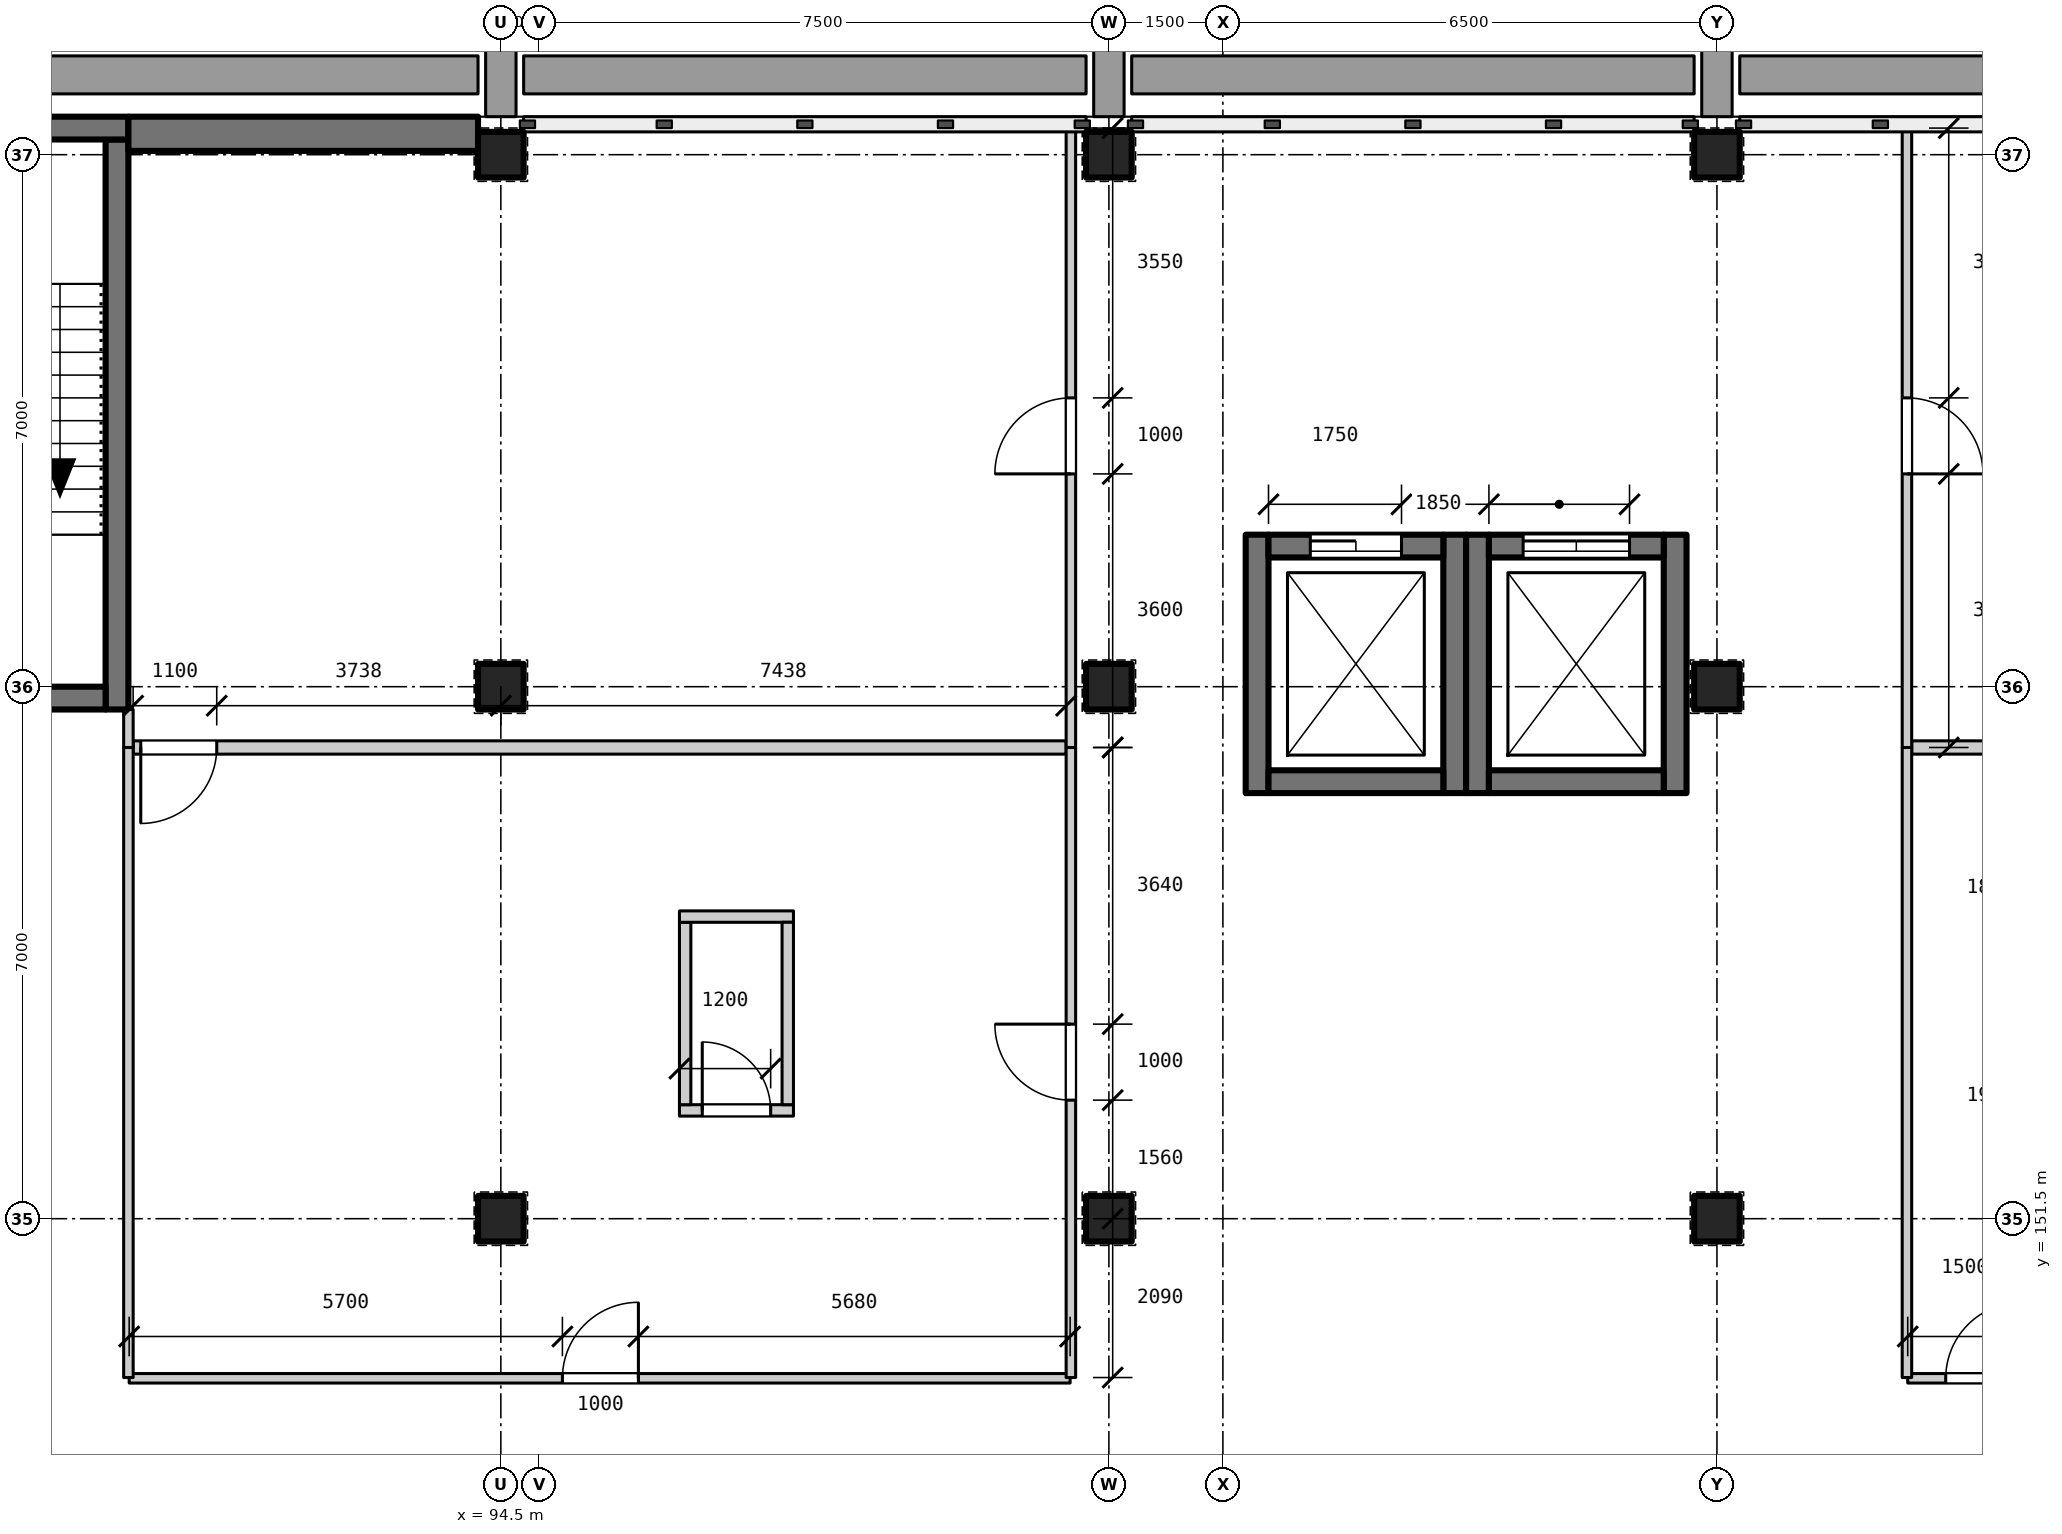
"""IFC4 building model, lengths in metres.
Left out: names, types, materials, properties, quantities, classifications, styles, units other than length and angle.
Written with IfcOpenShell. Run it as: python <this file> out.ifc"""

import sys

from ifc_helpers import new_model, si_unit, direction, frame, frame_2d, origin, origin_2d, place, context, subcontext, project, spatial, rectangle, extrude, element, fill, save


model = new_model("IFC4")
c1 = context("Model", 3, precision=1e-05, world=origin(), true_north=direction((0.0, 1.0)))
c2 = subcontext(c1, "Body", "Model", "MODEL_VIEW")
j1 = project(units=[si_unit("LENGTHUNIT", "METRE"), si_unit("PLANEANGLEUNIT", "RADIAN")], contexts=[c1])
p1 = place(None, origin())
s1 = spatial("IfcSite", under=j1, at=p1, CompositionType="ELEMENT")
p2 = place(p1, origin())
s2 = spatial("IfcBuilding", under=s1, at=p2, CompositionType="ELEMENT")
p3 = place(p2, frame((0.0, 0.0, 10.2)))
s3 = spatial("IfcBuildingStorey", under=s2, at=p3, CompositionType="ELEMENT", Elevation=10.2)
for number, where, z_axis, x_axis in (
    (1, (94.5, 151.5, 0.0), (0.0, 0.0, 1.0), (1.0, 0.0, 0.0)),
    (2, (94.5, 158.5, 0.0), (0.0, 0.0, 1.0), (1.0, 0.0, 0.0)),
    (3, (94.5, 165.5, 0.0), (0.0, 0.0, 1.0), (1.0, 0.0, 0.0)),
    (4, (102.5, 151.5, 0.0), (0.0, 0.0, 1.0), (1.0, 0.0, 0.0)),
    (5, (102.5, 158.5, 0.0), (0.0, 0.0, 1.0), (1.0, 0.0, 0.0)),
    (6, (102.5, 165.5, 0.0), (0.0, 0.0, 1.0), (1.0, 0.0, 0.0)),
    (7, (110.5, 151.5, 0.0), (0.0, 0.0, 1.0), (1.0, 0.0, 0.0)),
    (8, (110.5, 158.5, 0.0), (0.0, 0.0, 1.0), (1.0, 0.0, 0.0)),
    (9, (110.5, 165.5, 0.0), (0.0, 0.0, 1.0), (1.0, 0.0, 0.0)),
):
    element("IfcColumn", number, at=place(p3, frame(where, z_axis=z_axis, x_axis=x_axis)), inside=s3, PredefinedType="COLUMN", context=c2, shape_type="SweptSolid", body=[
        extrude(rectangle(XDim=0.6, YDim=0.6, at=origin_2d()), origin(), (0.0, 0.0, 1.0), 4.2),
    ])
p4 = place(p3, frame((89.45, 158.2, 0.0), z_axis=(0.0, 0.0, 1.0), x_axis=(0.0, 1.0, 0.0)))
e10 = element("IfcWall", 10, at=p4, inside=s3, PredefinedType="SHEAR", context=c2, shape_type="SweptSolid", body=[
    extrude(rectangle(XDim=7.5, YDim=0.3, at=frame_2d((3.75, 0.0))), origin(), (0.0, 0.0, 1.0), 4.2),
])
p5 = place(p3, frame((86.3, 158.35, 0.0), z_axis=(0.0, 0.0, 1.0), x_axis=(1.0, 0.0, 0.0)))
e11 = element("IfcWall", 11, at=p5, inside=s3, PredefinedType="SHEAR", context=c2, shape_type="SweptSolid", body=[
    extrude(rectangle(XDim=3.0, YDim=0.3, at=frame_2d((1.5, 0.0))), origin(), (0.0, 0.0, 1.0), 4.2),
])
p6 = place(p5, frame((0.95, 0.0, 0.0)))
e12 = element("IfcOpeningElement", 12, at=p6, cuts=e11, PredefinedType="OPENING", context=c2, shape_type="SweptSolid", body=[
    extrude(rectangle(XDim=1.1, YDim=2.1, at=frame_2d((0.55, 1.05))), frame((0.0, 0.16, 0.0), z_axis=(0.0, -1.0, 0.0), x_axis=(1.0, 0.0, 0.0)), (0.0, 0.0, 1.0), 0.32),
])
for number, where, z_axis, x_axis in (
    (13, (104.45, 157.1, 0.0), (0.0, 0.0, 1.0), (0.0, 1.0, 0.0)),
    (14, (107.05, 157.1, 0.0), (0.0, 0.0, 1.0), (0.0, 1.0, 0.0)),
):
    element("IfcWall", number, at=place(p3, frame(where, z_axis=z_axis, x_axis=x_axis)), inside=s3, PredefinedType="SHEAR", context=c2, shape_type="SweptSolid", body=[
        extrude(rectangle(XDim=3.4, YDim=0.3, at=frame_2d((1.7, 0.0))), origin(), (0.0, 0.0, 1.0), 4.2),
    ])
p7 = place(p3, frame((104.6, 157.25, 0.0), z_axis=(0.0, 0.0, 1.0), x_axis=(1.0, 0.0, 0.0)))
e15 = element("IfcWall", 15, at=p7, inside=s3, PredefinedType="SHEAR", context=c2, shape_type="SweptSolid", body=[
    extrude(rectangle(XDim=2.3, YDim=0.3, at=frame_2d((1.15, 0.0))), origin(), (0.0, 0.0, 1.0), 4.2),
])
p8 = place(p3, frame((104.6, 160.35, 0.0), z_axis=(0.0, 0.0, 1.0), x_axis=(1.0, 0.0, 0.0)))
e16 = element("IfcWall", 16, at=p8, inside=s3, PredefinedType="SHEAR", context=c2, shape_type="SweptSolid", body=[
    extrude(rectangle(XDim=2.3, YDim=0.3, at=frame_2d((1.15, 0.0))), origin(), (0.0, 0.0, 1.0), 4.2),
])
p9 = place(p8, frame((0.55, 0.0, 0.0)))
e17 = element("IfcOpeningElement", 17, at=p9, cuts=e16, PredefinedType="OPENING", context=c2, shape_type="SweptSolid", body=[
    extrude(rectangle(XDim=1.2, YDim=2.1, at=frame_2d((0.6, 1.05))), frame((0.0, 0.16, 0.0), z_axis=(0.0, -1.0, 0.0), x_axis=(1.0, 0.0, 0.0)), (0.0, 0.0, 1.0), 0.32),
])
for number, where, z_axis, x_axis in (
    (18, (107.35, 157.1, 0.0), (0.0, 0.0, 1.0), (0.0, 1.0, 0.0)),
    (19, (109.95, 157.1, 0.0), (0.0, 0.0, 1.0), (0.0, 1.0, 0.0)),
):
    element("IfcWall", number, at=place(p3, frame(where, z_axis=z_axis, x_axis=x_axis)), inside=s3, PredefinedType="SHEAR", context=c2, shape_type="SweptSolid", body=[
        extrude(rectangle(XDim=3.4, YDim=0.3, at=frame_2d((1.7, 0.0))), origin(), (0.0, 0.0, 1.0), 4.2),
    ])
p10 = place(p3, frame((107.5, 157.25, 0.0), z_axis=(0.0, 0.0, 1.0), x_axis=(1.0, 0.0, 0.0)))
e20 = element("IfcWall", 20, at=p10, inside=s3, PredefinedType="SHEAR", context=c2, shape_type="SweptSolid", body=[
    extrude(rectangle(XDim=2.3, YDim=0.3, at=frame_2d((1.15, 0.0))), origin(), (0.0, 0.0, 1.0), 4.2),
])
p11 = place(p3, frame((107.5, 160.35, 0.0), z_axis=(0.0, 0.0, 1.0), x_axis=(1.0, 0.0, 0.0)))
e21 = element("IfcWall", 21, at=p11, inside=s3, PredefinedType="SHEAR", context=c2, shape_type="SweptSolid", body=[
    extrude(rectangle(XDim=2.3, YDim=0.3, at=frame_2d((1.15, 0.0))), origin(), (0.0, 0.0, 1.0), 4.2),
])
p12 = place(p11, frame((0.45, 0.0, 0.0)))
e22 = element("IfcOpeningElement", 22, at=p12, cuts=e21, PredefinedType="OPENING", context=c2, shape_type="SweptSolid", body=[
    extrude(rectangle(XDim=1.4, YDim=2.1, at=frame_2d((0.7, 1.05))), frame((0.0, 0.16, 0.0), z_axis=(0.0, -1.0, 0.0), x_axis=(1.0, 0.0, 0.0)), (0.0, 0.0, 1.0), 0.32),
])
p13 = place(p3, frame((86.0, 165.85, 0.0), z_axis=(0.0, 0.0, 1.0), x_axis=(1.0, 0.0, 0.0)))
e23 = element("IfcWall", 23, at=p13, inside=s3, PredefinedType="SOLIDWALL", context=c2, shape_type="SweptSolid", body=[
    extrude(rectangle(XDim=3.6, YDim=0.3, at=frame_2d((1.8, 0.0))), origin(), (0.0, 0.0, 1.0), 3.9),
])
p14 = place(p3, frame((89.6, 165.775, 0.0), z_axis=(0.0, 0.0, 1.0), x_axis=(1.0, 0.0, 0.0)))
e24 = element("IfcWall", 24, at=p14, inside=s3, PredefinedType="SOLIDWALL", context=c2, shape_type="SweptSolid", body=[
    extrude(rectangle(XDim=4.6, YDim=0.45, at=frame_2d((2.3, 0.0))), origin(), (0.0, 0.0, 1.0), 3.1),
])
p15 = place(p3, frame((96.85, 152.925, 0.0), z_axis=(0.0, 0.0, 1.0), x_axis=(1.0, 0.0, 0.0)))
e25 = element("IfcWall", 25, at=p15, inside=s3, PredefinedType="PARTITIONING", context=c2, shape_type="SweptSolid", body=[
    extrude(rectangle(XDim=1.5, YDim=0.15, at=frame_2d((0.75, 0.0))), origin(), (0.0, 0.0, 1.0), 3.9),
])
p16 = place(p15, frame((0.3, 0.0, 0.0)))
e26 = element("IfcOpeningElement", 26, at=p16, cuts=e25, PredefinedType="OPENING", context=c2, shape_type="SweptSolid", body=[
    extrude(rectangle(XDim=0.9, YDim=2.1, at=frame_2d((0.45, 1.05))), frame((0.0, 0.085, 0.0), z_axis=(0.0, -1.0, 0.0), x_axis=(1.0, 0.0, 0.0)), (0.0, 0.0, 1.0), 0.17),
])
p17 = place(p3, frame((96.925, 153.0, 0.0), z_axis=(0.0, 0.0, 1.0), x_axis=(0.0, 1.0, 0.0)))
e27 = element("IfcWall", 27, at=p17, inside=s3, PredefinedType="PARTITIONING", context=c2, shape_type="SweptSolid", body=[
    extrude(rectangle(XDim=2.4, YDim=0.15, at=frame_2d((1.2, 0.0))), origin(), (0.0, 0.0, 1.0), 3.9),
])
p18 = place(p3, frame((96.85, 155.475, 0.0), z_axis=(0.0, 0.0, 1.0), x_axis=(1.0, 0.0, 0.0)))
e28 = element("IfcWall", 28, at=p18, inside=s3, PredefinedType="PARTITIONING", context=c2, shape_type="SweptSolid", body=[
    extrude(rectangle(XDim=1.5, YDim=0.15, at=frame_2d((0.75, 0.0))), origin(), (0.0, 0.0, 1.0), 3.9),
])
p19 = place(p3, frame((98.275, 153.0, 0.0), z_axis=(0.0, 0.0, 1.0), x_axis=(0.0, 1.0, 0.0)))
e29 = element("IfcWall", 29, at=p19, inside=s3, PredefinedType="PARTITIONING", context=c2, shape_type="SweptSolid", body=[
    extrude(rectangle(XDim=2.4, YDim=0.15, at=frame_2d((1.2, 0.0))), origin(), (0.0, 0.0, 1.0), 3.9),
])
p20 = place(p3, frame((89.61, 149.4, 0.0), z_axis=(0.0, 0.0, 1.0), x_axis=(1.0, 0.0, 0.0)))
e30 = element("IfcWall", 30, at=p20, inside=s3, PredefinedType="PARTITIONING", context=c2, shape_type="SweptSolid", body=[
    extrude(rectangle(XDim=12.38, YDim=0.125, at=frame_2d((6.19, 0.0))), origin(), (0.0, 0.0, 1.0), 3.9),
])
p21 = place(p20, frame((5.7, 0.0, 0.0)))
e31 = element("IfcOpeningElement", 31, at=p21, cuts=e30, PredefinedType="OPENING", context=c2, shape_type="SweptSolid", body=[
    extrude(rectangle(XDim=1.0, YDim=2.1, at=frame_2d((0.5, 1.05))), frame((0.0, 0.073, 0.0), z_axis=(0.0, -1.0, 0.0), x_axis=(1.0, 0.0, 0.0)), (0.0, 0.0, 1.0), 0.145),
])
p22 = place(p3, frame((113.01, 149.4, 0.0), z_axis=(0.0, 0.0, 1.0), x_axis=(1.0, 0.0, 0.0)))
e32 = element("IfcWall", 32, at=p22, inside=s3, PredefinedType="PARTITIONING", context=c2, shape_type="SweptSolid", body=[
    extrude(rectangle(XDim=1.99, YDim=0.125, at=frame_2d((0.995, 0.0))), origin(), (0.0, 0.0, 1.0), 3.9),
])
p23 = place(p22, frame((0.5, 0.0, 0.0)))
e33 = element("IfcOpeningElement", 33, at=p23, cuts=e32, PredefinedType="OPENING", context=c2, shape_type="SweptSolid", body=[
    extrude(rectangle(XDim=1.0, YDim=2.1, at=frame_2d((0.5, 1.05))), frame((0.0, 0.073, 0.0), z_axis=(0.0, -1.0, 0.0), x_axis=(1.0, 0.0, 0.0)), (0.0, 0.0, 1.0), 0.145),
])
p24 = place(p3, frame((89.663, 157.7, 0.0), z_axis=(0.0, 0.0, 1.0), x_axis=(1.0, 0.0, 0.0)))
e34 = element("IfcWall", 34, at=p24, inside=s3, PredefinedType="PARTITIONING", context=c2, shape_type="SweptSolid", body=[
    extrude(rectangle(XDim=12.275, YDim=0.175, at=frame_2d((6.137, 0.0))), origin(), (0.0, 0.0, 1.0), 3.9),
])
p25 = place(p24, frame((0.1, 0.0, 0.0)))
e35 = element("IfcOpeningElement", 35, at=p25, cuts=e34, PredefinedType="OPENING", context=c2, shape_type="SweptSolid", body=[
    extrude(rectangle(XDim=1.0, YDim=2.1, at=frame_2d((0.5, 1.05))), frame((0.0, 0.097, 0.0), z_axis=(0.0, -1.0, 0.0), x_axis=(1.0, 0.0, 0.0)), (0.0, 0.0, 1.0), 0.195),
])
p26 = place(p3, frame((113.062, 157.7, 0.0), z_axis=(0.0, 0.0, 1.0), x_axis=(1.0, 0.0, 0.0)))
e36 = element("IfcWall", 36, at=p26, inside=s3, PredefinedType="PARTITIONING", context=c2, shape_type="SweptSolid", body=[
    extrude(rectangle(XDim=1.938, YDim=0.175, at=frame_2d((0.969, 0.0))), origin(), (0.0, 0.0, 1.0), 3.9),
])
p27 = place(p3, frame((89.6, 149.41, 0.0), z_axis=(0.0, 0.0, 1.0), x_axis=(0.0, 1.0, 0.0)))
e37 = element("IfcWall", 37, at=p27, inside=s3, PredefinedType="PARTITIONING", context=c2, shape_type="SweptSolid", body=[
    extrude(rectangle(XDim=8.29, YDim=0.125, at=frame_2d((4.145, 0.0))), origin(), (0.0, 0.0, 1.0), 3.9),
])
p28 = place(p3, frame((89.6, 157.7, 0.0), z_axis=(0.0, 0.0, 1.0), x_axis=(0.0, 1.0, 0.0)))
e38 = element("IfcWall", 38, at=p28, inside=s3, PredefinedType="PARTITIONING", context=c2, shape_type="SweptSolid", body=[
    extrude(rectangle(XDim=0.5, YDim=0.125, at=frame_2d((0.25, 0.0))), origin(), (0.0, 0.0, 1.0), 3.9),
])
p29 = place(p3, frame((102.0, 149.41, 0.0), z_axis=(0.0, 0.0, 1.0), x_axis=(0.0, 1.0, 0.0)))
e39 = element("IfcWall", 39, at=p29, inside=s3, PredefinedType="PARTITIONING", context=c2, shape_type="SweptSolid", body=[
    extrude(rectangle(XDim=8.29, YDim=0.125, at=frame_2d((4.145, 0.0))), origin(), (0.0, 0.0, 1.0), 3.9),
])
p30 = place(p29, frame((3.65, 0.0, 0.0)))
e40 = element("IfcOpeningElement", 40, at=p30, cuts=e39, PredefinedType="OPENING", context=c2, shape_type="SweptSolid", body=[
    extrude(rectangle(XDim=1.0, YDim=2.1, at=frame_2d((0.5, 1.05))), frame((0.0, 0.073, 0.0), z_axis=(0.0, -1.0, 0.0), x_axis=(1.0, 0.0, 0.0)), (0.0, 0.0, 1.0), 0.145),
])
p31 = place(p3, frame((102.0, 157.7, 0.0), z_axis=(0.0, 0.0, 1.0), x_axis=(0.0, 1.0, 0.0)))
e41 = element("IfcWall", 41, at=p31, inside=s3, PredefinedType="PARTITIONING", context=c2, shape_type="SweptSolid", body=[
    extrude(rectangle(XDim=8.15, YDim=0.125, at=frame_2d((4.075, 0.0))), origin(), (0.0, 0.0, 1.0), 3.9),
])
p32 = place(p31, frame((3.6, 0.0, 0.0)))
e42 = element("IfcOpeningElement", 42, at=p32, cuts=e41, PredefinedType="OPENING", context=c2, shape_type="SweptSolid", body=[
    extrude(rectangle(XDim=1.0, YDim=2.1, at=frame_2d((0.5, 1.05))), frame((0.0, 0.073, 0.0), z_axis=(0.0, -1.0, 0.0), x_axis=(1.0, 0.0, 0.0)), (0.0, 0.0, 1.0), 0.145),
])
p33 = place(p3, frame((113.0, 149.41, 0.0), z_axis=(0.0, 0.0, 1.0), x_axis=(0.0, 1.0, 0.0)))
e43 = element("IfcWall", 43, at=p33, inside=s3, PredefinedType="PARTITIONING", context=c2, shape_type="SweptSolid", body=[
    extrude(rectangle(XDim=8.29, YDim=0.125, at=frame_2d((4.145, 0.0))), origin(), (0.0, 0.0, 1.0), 3.9),
])
p34 = place(p3, frame((113.0, 157.7, 0.0), z_axis=(0.0, 0.0, 1.0), x_axis=(0.0, 1.0, 0.0)))
e44 = element("IfcWall", 44, at=p34, inside=s3, PredefinedType="PARTITIONING", context=c2, shape_type="SweptSolid", body=[
    extrude(rectangle(XDim=8.15, YDim=0.125, at=frame_2d((4.075, 0.0))), origin(), (0.0, 0.0, 1.0), 3.9),
])
p35 = place(p34, frame((3.6, 0.0, 0.0)))
e45 = element("IfcOpeningElement", 45, at=p35, cuts=e44, PredefinedType="OPENING", context=c2, shape_type="SweptSolid", body=[
    extrude(rectangle(XDim=1.0, YDim=2.1, at=frame_2d((0.5, 1.05))), frame((0.0, 0.073, 0.0), z_axis=(0.0, -1.0, 0.0), x_axis=(1.0, 0.0, 0.0)), (0.0, 0.0, 1.0), 0.145),
])
p36 = place(p21, origin())
e46 = element("IfcDoor", 46, at=p36, inside=s3, OperationType="SINGLE_SWING_RIGHT", PredefinedType="DOOR", context=c2, shape_type="SweptSolid", body=[
    extrude(rectangle(XDim=1.0, YDim=2.1, at=frame_2d((0.5, 1.05))), frame((0.0, 0.025, 0.0), z_axis=(0.0, -1.0, 0.0), x_axis=(1.0, 0.0, 0.0)), (0.0, 0.0, 1.0), 0.05),
])
fill(e31, e46)
p37 = place(p23, origin())
e47 = element("IfcDoor", 47, at=p37, inside=s3, OperationType="SINGLE_SWING_RIGHT", PredefinedType="DOOR", context=c2, shape_type="SweptSolid", body=[
    extrude(rectangle(XDim=1.0, YDim=2.1, at=frame_2d((0.5, 1.05))), frame((0.0, 0.025, 0.0), z_axis=(0.0, -1.0, 0.0), x_axis=(1.0, 0.0, 0.0)), (0.0, 0.0, 1.0), 0.05),
])
fill(e33, e47)
p38 = place(p16, origin())
e48 = element("IfcDoor", 48, at=p38, inside=s3, OperationType="SINGLE_SWING_LEFT", PredefinedType="DOOR", context=c2, shape_type="SweptSolid", body=[
    extrude(rectangle(XDim=0.9, YDim=2.1, at=frame_2d((0.45, 1.05))), frame((0.0, 0.025, 0.0), z_axis=(0.0, -1.0, 0.0), x_axis=(1.0, 0.0, 0.0)), (0.0, 0.0, 1.0), 0.05),
])
fill(e26, e48)
p39 = place(p30, origin())
e49 = element("IfcDoor", 49, at=p39, inside=s3, OperationType="SINGLE_SWING_RIGHT", PredefinedType="DOOR", context=c2, shape_type="SweptSolid", body=[
    extrude(rectangle(XDim=1.0, YDim=2.1, at=frame_2d((0.5, 1.05))), frame((0.0, 0.025, 0.0), z_axis=(0.0, -1.0, 0.0), x_axis=(1.0, 0.0, 0.0)), (0.0, 0.0, 1.0), 0.05),
])
fill(e40, e49)
p40 = place(p25, frame((1.0, 0.0, 0.0), z_axis=(0.0, 0.0, 1.0), x_axis=(-1.0, 0.0, 0.0)))
e50 = element("IfcDoor", 50, at=p40, inside=s3, OperationType="SINGLE_SWING_RIGHT", PredefinedType="DOOR", context=c2, shape_type="SweptSolid", body=[
    extrude(rectangle(XDim=1.0, YDim=2.1, at=frame_2d((0.5, 1.05))), frame((0.0, 0.025, 0.0), z_axis=(0.0, -1.0, 0.0), x_axis=(1.0, 0.0, 0.0)), (0.0, 0.0, 1.0), 0.05),
])
fill(e35, e50)
p41 = place(p32, origin())
e51 = element("IfcDoor", 51, at=p41, inside=s3, OperationType="SINGLE_SWING_LEFT", PredefinedType="DOOR", context=c2, shape_type="SweptSolid", body=[
    extrude(rectangle(XDim=1.0, YDim=2.1, at=frame_2d((0.5, 1.05))), frame((0.0, 0.025, 0.0), z_axis=(0.0, -1.0, 0.0), x_axis=(1.0, 0.0, 0.0)), (0.0, 0.0, 1.0), 0.05),
])
fill(e42, e51)
p42 = place(p35, frame((1.0, 0.0, 0.0), z_axis=(0.0, 0.0, 1.0), x_axis=(-1.0, 0.0, 0.0)))
e52 = element("IfcDoor", 52, at=p42, inside=s3, OperationType="SINGLE_SWING_RIGHT", PredefinedType="DOOR", context=c2, shape_type="SweptSolid", body=[
    extrude(rectangle(XDim=1.0, YDim=2.1, at=frame_2d((0.5, 1.05))), frame((0.0, 0.025, 0.0), z_axis=(0.0, -1.0, 0.0), x_axis=(1.0, 0.0, 0.0)), (0.0, 0.0, 1.0), 0.05),
])
fill(e45, e52)
p43 = place(p9, origin())
e53 = element("IfcDoor", 53, at=p43, inside=s3, OperationType="SLIDING_TO_LEFT", PredefinedType="DOOR", context=c2, shape_type="SweptSolid", body=[
    extrude(rectangle(XDim=1.2, YDim=2.1, at=frame_2d((0.6, 1.05))), frame((0.0, 0.025, 0.0), z_axis=(0.0, -1.0, 0.0), x_axis=(1.0, 0.0, 0.0)), (0.0, 0.0, 1.0), 0.05),
])
fill(e17, e53)
p44 = place(p12, origin())
e54 = element("IfcDoor", 54, at=p44, inside=s3, OperationType="DOUBLE_DOOR_SLIDING", PredefinedType="DOOR", context=c2, shape_type="SweptSolid", body=[
    extrude(rectangle(XDim=1.4, YDim=2.1, at=frame_2d((0.7, 1.05))), frame((0.0, 0.025, 0.0), z_axis=(0.0, -1.0, 0.0), x_axis=(1.0, 0.0, 0.0)), (0.0, 0.0, 1.0), 0.05),
])
fill(e22, e54)
save(model, sys.argv[1])
